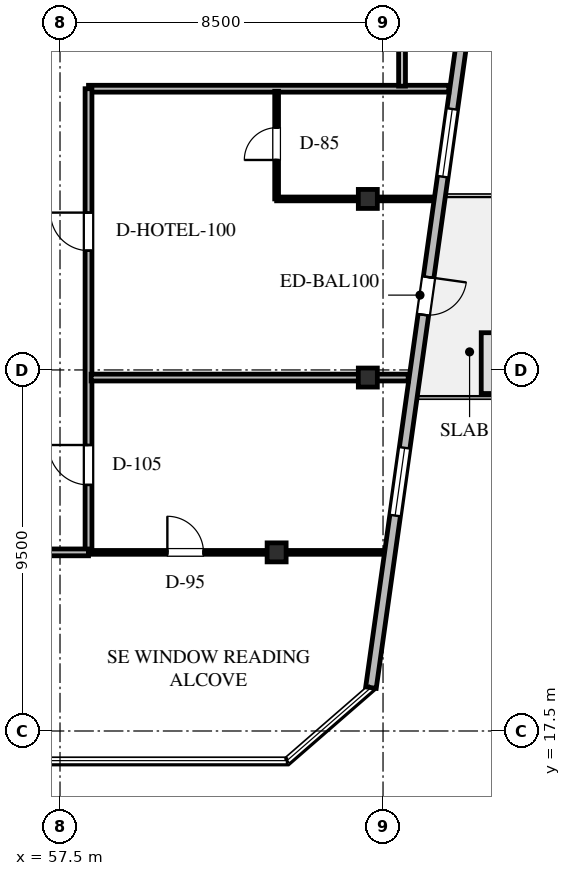
"""IFC4 building model, lengths in metres.
Left out: names, types, materials, properties, quantities, classifications, styles, units other than length and angle.
Written with IfcOpenShell. Run it as: python <this file> out.ifc"""

import sys

from ifc_helpers import new_model, si_unit, direction, frame, frame_2d, origin, origin_2d, place, context, subcontext, project, spatial, rectangle, hollow_rectangle, extrude, element, fill, save


model = new_model("IFC4")
c1 = context("Model", 3, precision=1e-05, world=origin(), true_north=direction((0.0, 1.0)))
c2 = subcontext(c1, "Body", "Model", "MODEL_VIEW")
j1 = project(units=[si_unit("LENGTHUNIT", "METRE"), si_unit("PLANEANGLEUNIT", "RADIAN")], contexts=[c1])
p1 = place(None, origin())
s1 = spatial("IfcSite", under=j1, at=p1, CompositionType="ELEMENT")
p2 = place(p1, origin())
s2 = spatial("IfcBuilding", under=s1, at=p2, CompositionType="ELEMENT")
p3 = place(p2, frame((0.0, 0.0, 234.6)))
s3 = spatial("IfcBuildingStorey", under=s2, at=p3, CompositionType="ELEMENT", Elevation=234.6)
for number, where, z_axis, x_axis in (
    (1, (65.6, 31.5, 0.0), (0.0, 0.0, 1.0), (1.0, 0.0, 0.0)),
    (2, (65.6, 26.8, 0.0), (0.0, 0.0, 1.0), (1.0, 0.0, 0.0)),
    (3, (63.2, 22.2, 0.0), (0.0, 0.0, 1.0), (1.0, 0.0, 0.0)),
):
    element("IfcColumn", number, at=place(p3, frame(where, z_axis=z_axis, x_axis=x_axis)), inside=s3, PredefinedType="COLUMN", context=c2, shape_type="SweptSolid", body=[
        extrude(hollow_rectangle(XDim=0.5, YDim=0.5, WallThickness=0.02, at=origin_2d()), origin(), (0.0, 0.0, 1.0), 3.6),
    ])
p4 = place(p3, frame((68.375, 37.8, 0.0), z_axis=(0.0, 0.0, 1.0), x_axis=(-0.139164922175, -0.99026921816, 0.0)))
e4 = element("IfcWall", 4, at=p4, inside=s3, PredefinedType="STANDARD", context=c2, shape_type="SweptSolid", body=[
    extrude(rectangle(XDim=19.347, YDim=0.28, at=frame_2d((9.673, 0.0))), origin(), (0.0, 0.0, 1.0), 3.36),
])
p5 = place(p4, frame((8.44, 0.0, 0.0)))
e5 = element("IfcOpeningElement", 5, at=p5, cuts=e4, PredefinedType="OPENING", context=c2, shape_type="SweptSolid", body=[
    extrude(rectangle(XDim=1.0, YDim=2.15, at=frame_2d((0.5, 1.075))), frame((0.0, 0.15, 0.0), z_axis=(0.0, -1.0, 0.0), x_axis=(1.0, 0.0, 0.0)), (0.0, 0.0, 1.0), 0.3),
])
p6 = place(p4, frame((3.971, 0.0, 0.65)))
e6 = element("IfcOpeningElement", 6, at=p6, cuts=e4, PredefinedType="OPENING", context=c2, shape_type="SweptSolid", body=[
    extrude(rectangle(XDim=1.8, YDim=2.1, at=frame_2d((0.9, 1.05))), frame((0.0, 0.15, 0.0), z_axis=(0.0, -1.0, 0.0), x_axis=(1.0, 0.0, 0.0)), (0.0, 0.0, 1.0), 0.3),
])
p7 = place(p4, frame((12.975, 0.0, 0.65)))
e7 = element("IfcOpeningElement", 7, at=p7, cuts=e4, PredefinedType="OPENING", context=c2, shape_type="SweptSolid", body=[
    extrude(rectangle(XDim=1.8, YDim=2.1, at=frame_2d((0.9, 1.05))), frame((0.0, 0.15, 0.0), z_axis=(0.0, -1.0, 0.0), x_axis=(1.0, 0.0, 0.0)), (0.0, 0.0, 1.0), 0.3),
])
p8 = place(p3, frame((58.25, 34.4, 0.0), z_axis=(0.0, 0.0, 1.0), x_axis=(1.0, 0.0, 0.0)))
e8 = element("IfcWall", 8, at=p8, inside=s3, PredefinedType="STANDARD", context=c2, shape_type="SweptSolid", body=[
    extrude(rectangle(XDim=9.481, YDim=0.18, at=frame_2d((4.74, 0.0))), origin(), (0.0, 0.0, 1.0), 3.36),
])
p9 = place(p3, frame((66.5, 34.468, 0.0), z_axis=(0.0, 0.0, 1.0), x_axis=(0.0, 1.0, 0.0)))
e9 = element("IfcWall", 9, at=p9, inside=s3, PredefinedType="STANDARD", context=c2, shape_type="SweptSolid", body=[
    extrude(rectangle(XDim=3.582, YDim=0.18, at=frame_2d((1.791, 0.0))), origin(), (0.0, 0.0, 1.0), 2.664),
])
p10 = place(p3, frame((58.25, 22.2, 0.0), z_axis=(0.0, 0.0, 1.0), x_axis=(0.0, 1.0, 0.0)))
e10 = element("IfcWall", 10, at=p10, inside=s3, PredefinedType="STANDARD", context=c2, shape_type="SweptSolid", body=[
    extrude(rectangle(XDim=12.2, YDim=0.18, at=frame_2d((6.1, 0.0))), origin(), (0.0, 0.0, 1.0), 2.664),
])
p11 = place(p10, frame((1.775, 0.0, 0.0)))
e11 = element("IfcOpeningElement", 11, at=p11, cuts=e10, PredefinedType="OPENING", context=c2, shape_type="SweptSolid", body=[
    extrude(rectangle(XDim=1.05, YDim=2.2, at=frame_2d((0.525, 1.1))), frame((0.0, 0.1, 0.0), z_axis=(0.0, -1.0, 0.0), x_axis=(1.0, 0.0, 0.0)), (0.0, 0.0, 1.0), 0.2),
])
p12 = place(p10, frame((7.94, 0.0, 0.0)))
e12 = element("IfcOpeningElement", 12, at=p12, cuts=e10, PredefinedType="OPENING", context=c2, shape_type="SweptSolid", body=[
    extrude(rectangle(XDim=1.0, YDim=2.15, at=frame_2d((0.5, 1.075))), frame((0.0, 0.1, 0.0), z_axis=(0.0, -1.0, 0.0), x_axis=(1.0, 0.0, 0.0)), (0.0, 0.0, 1.0), 0.2),
])
p13 = place(p3, frame((56.0, 22.2, 0.0), z_axis=(0.0, 0.0, 1.0), x_axis=(1.0, 0.0, 0.0)))
e13 = element("IfcWall", 13, at=p13, inside=s3, PredefinedType="STANDARD", context=c2, shape_type="SweptSolid", body=[
    extrude(rectangle(XDim=2.25, YDim=0.18, at=frame_2d((1.125, 0.0))), origin(), (0.0, 0.0, 1.0), 2.664),
])
p14 = place(p3, frame((58.318, 26.8, 0.0), z_axis=(0.0, 0.0, 1.0), x_axis=(1.0, 0.0, 0.0)))
e14 = element("IfcWall", 14, at=p14, inside=s3, PredefinedType="STANDARD", context=c2, shape_type="SweptSolid", body=[
    extrude(rectangle(XDim=8.344, YDim=0.18, at=frame_2d((4.172, 0.0))), origin(), (0.0, 0.0, 1.0), 2.664),
])
p15 = place(p3, frame((58.25, 22.2, 0.0), z_axis=(0.0, 0.0, 1.0), x_axis=(1.0, 0.0, 0.0)))
e15 = element("IfcWall", 15, at=p15, inside=s3, PredefinedType="PARTITIONING", context=c2, shape_type="SweptSolid", body=[
    extrude(rectangle(XDim=7.766, YDim=0.1, at=frame_2d((3.883, 0.0))), origin(), (0.0, 0.0, 1.0), 2.664),
])
p16 = place(p15, frame((2.075, 0.0, 0.0)))
e16 = element("IfcOpeningElement", 16, at=p16, cuts=e15, PredefinedType="OPENING", context=c2, shape_type="SweptSolid", body=[
    extrude(rectangle(XDim=0.95, YDim=2.15, at=frame_2d((0.475, 1.075))), frame((0.0, 0.06, 0.0), z_axis=(0.0, -1.0, 0.0), x_axis=(1.0, 0.0, 0.0)), (0.0, 0.0, 1.0), 0.12),
])
p17 = place(p3, frame((63.2, 31.5, 0.0), z_axis=(0.0, 0.0, 1.0), x_axis=(1.0, 0.0, 0.0)))
e17 = element("IfcWall", 17, at=p17, inside=s3, PredefinedType="PARTITIONING", context=c2, shape_type="SweptSolid", body=[
    extrude(rectangle(XDim=4.123, YDim=0.1, at=frame_2d((2.062, 0.0))), origin(), (0.0, 0.0, 1.0), 2.664),
])
p18 = place(p3, frame((63.2, 31.5, 0.0), z_axis=(0.0, 0.0, 1.0), x_axis=(0.0, 1.0, 0.0)))
e18 = element("IfcWall", 18, at=p18, inside=s3, PredefinedType="PARTITIONING", context=c2, shape_type="SweptSolid", body=[
    extrude(rectangle(XDim=2.832, YDim=0.1, at=frame_2d((1.416, 0.0))), origin(), (0.0, 0.0, 1.0), 2.664),
])
p19 = place(p18, frame((1.025, 0.0, 0.0)))
e19 = element("IfcOpeningElement", 19, at=p19, cuts=e18, PredefinedType="OPENING", context=c2, shape_type="SweptSolid", body=[
    extrude(rectangle(XDim=0.85, YDim=2.1, at=frame_2d((0.425, 1.05))), frame((0.0, 0.06, 0.0), z_axis=(0.0, -1.0, 0.0), x_axis=(1.0, 0.0, 0.0)), (0.0, 0.0, 1.0), 0.12),
])
p20 = place(p5, origin())
e20 = element("IfcDoor", 20, at=p20, inside=s3, OperationType="SINGLE_SWING_LEFT", PredefinedType="DOOR", context=c2, shape_type="SweptSolid", body=[
    extrude(rectangle(XDim=1.0, YDim=2.15, at=frame_2d((0.5, 1.075))), frame((0.0, 0.025, 0.0), z_axis=(0.0, -1.0, 0.0), x_axis=(1.0, 0.0, 0.0)), (0.0, 0.0, 1.0), 0.05),
])
fill(e5, e20)
p21 = place(p6, origin())
e21 = element("IfcWindow", 21, at=p21, inside=s3, PartitioningType="SINGLE_PANEL", PredefinedType="WINDOW", context=c2, shape_type="SweptSolid", body=[
    extrude(rectangle(XDim=1.8, YDim=2.1, at=frame_2d((0.9, 1.05))), frame((0.0, 0.03, 0.0), z_axis=(0.0, -1.0, 0.0), x_axis=(1.0, 0.0, 0.0)), (0.0, 0.0, 1.0), 0.06),
])
fill(e6, e21)
p22 = place(p7, origin())
e22 = element("IfcWindow", 22, at=p22, inside=s3, PartitioningType="SINGLE_PANEL", PredefinedType="WINDOW", context=c2, shape_type="SweptSolid", body=[
    extrude(rectangle(XDim=1.8, YDim=2.1, at=frame_2d((0.9, 1.05))), frame((0.0, 0.03, 0.0), z_axis=(0.0, -1.0, 0.0), x_axis=(1.0, 0.0, 0.0)), (0.0, 0.0, 1.0), 0.06),
])
fill(e7, e22)
p23 = place(p11, origin())
e23 = element("IfcDoor", 23, at=p23, inside=s3, OperationType="SINGLE_SWING_RIGHT", PredefinedType="DOOR", context=c2, shape_type="SweptSolid", body=[
    extrude(rectangle(XDim=1.05, YDim=2.2, at=frame_2d((0.525, 1.1))), frame((0.0, 0.025, 0.0), z_axis=(0.0, -1.0, 0.0), x_axis=(1.0, 0.0, 0.0)), (0.0, 0.0, 1.0), 0.05),
])
fill(e11, e23)
p24 = place(p16, origin())
e24 = element("IfcDoor", 24, at=p24, inside=s3, OperationType="SINGLE_SWING_LEFT", PredefinedType="DOOR", context=c2, shape_type="SweptSolid", body=[
    extrude(rectangle(XDim=0.95, YDim=2.15, at=frame_2d((0.475, 1.075))), frame((0.0, 0.025, 0.0), z_axis=(0.0, -1.0, 0.0), x_axis=(1.0, 0.0, 0.0)), (0.0, 0.0, 1.0), 0.05),
])
fill(e16, e24)
p25 = place(p12, origin())
e25 = element("IfcDoor", 25, at=p25, inside=s3, OperationType="SINGLE_SWING_RIGHT", PredefinedType="DOOR", context=c2, shape_type="SweptSolid", body=[
    extrude(rectangle(XDim=1.0, YDim=2.15, at=frame_2d((0.5, 1.075))), frame((0.0, 0.025, 0.0), z_axis=(0.0, -1.0, 0.0), x_axis=(1.0, 0.0, 0.0)), (0.0, 0.0, 1.0), 0.05),
])
fill(e12, e25)
p26 = place(p19, origin())
e26 = element("IfcDoor", 26, at=p26, inside=s3, OperationType="SINGLE_SWING_LEFT", PredefinedType="DOOR", context=c2, shape_type="SweptSolid", body=[
    extrude(rectangle(XDim=0.85, YDim=2.1, at=frame_2d((0.425, 1.05))), frame((0.0, 0.025, 0.0), z_axis=(0.0, -1.0, 0.0), x_axis=(1.0, 0.0, 0.0)), (0.0, 0.0, 1.0), 0.05),
])
fill(e19, e26)
save(model, sys.argv[1])
